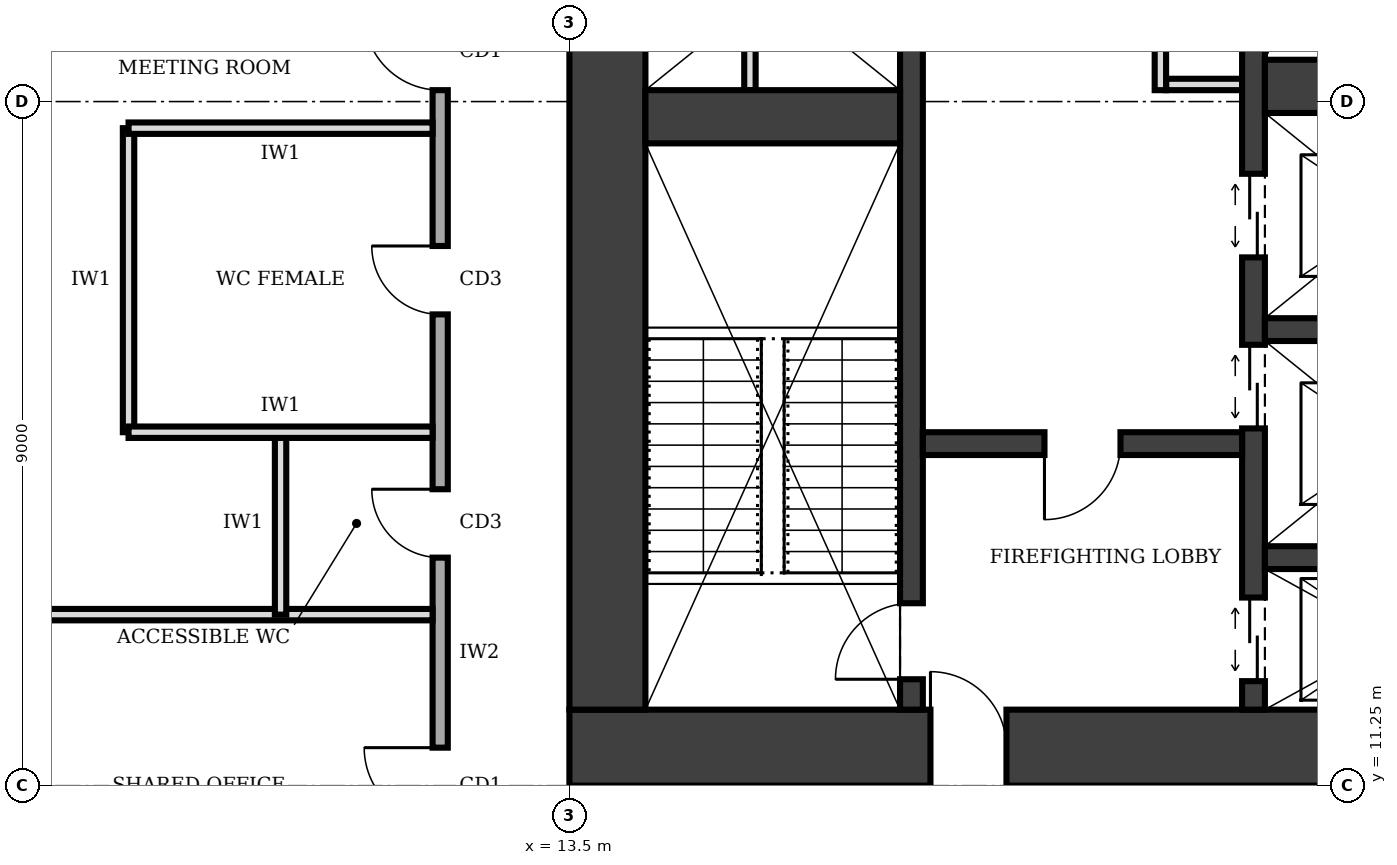
"""IFC4 building model, lengths in metres.
Left out: names, types, materials, properties, quantities, classifications, styles, units other than length and angle.
Written with IfcOpenShell. Run it as: python <this file> out.ifc"""

import sys

from ifc_helpers import new_model, si_unit, direction, frame, frame_2d, origin, place, context, subcontext, project, spatial, rectangle, extrude, element, fill, save


model = new_model("IFC4")
c1 = context("Model", 3, precision=1e-05, world=origin(), true_north=direction((0.0, 1.0)))
c2 = subcontext(c1, "Body", "Model", "MODEL_VIEW")
j1 = project(units=[si_unit("LENGTHUNIT", "METRE"), si_unit("PLANEANGLEUNIT", "RADIAN")], contexts=[c1])
p1 = place(None, origin())
s1 = spatial("IfcSite", under=j1, at=p1, CompositionType="ELEMENT")
p2 = place(p1, origin())
s2 = spatial("IfcBuilding", under=s1, at=p2, CompositionType="ELEMENT")
p3 = place(p2, frame((0.0, 0.0, 145.0)))
s3 = spatial("IfcBuildingStorey", under=s2, at=p3, CompositionType="ELEMENT", Elevation=145.0)
p4 = place(p3, frame((13.5, 11.75, 0.0), z_axis=(0.0, 0.0, 1.0), x_axis=(1.0, 0.0, 0.0)))
e1 = element("IfcWall", 1, at=p4, inside=s3, PredefinedType="SHEAR", context=c2, shape_type="SweptSolid", body=[
    extrude(rectangle(XDim=13.5, YDim=1.0, at=frame_2d((6.75, 0.0))), origin(), (0.0, 0.0, 1.0), 4.0),
])
p5 = place(p4, frame((4.75, 0.0, 0.0)))
e2 = element("IfcOpeningElement", 2, at=p5, cuts=e1, PredefinedType="OPENING", context=c2, shape_type="SweptSolid", body=[
    extrude(rectangle(XDim=1.0, YDim=2.1, at=frame_2d((0.5, 1.05))), frame((0.0, 0.51, 0.0), z_axis=(0.0, -1.0, 0.0), x_axis=(1.0, 0.0, 0.0)), (0.0, 0.0, 1.0), 1.02),
])
p6 = place(p3, frame((14.0, 28.25, 0.0), z_axis=(0.0, 0.0, 1.0), x_axis=(0.0, -1.0, 0.0)))
e3 = element("IfcWall", 3, at=p6, inside=s3, PredefinedType="SHEAR", context=c2, shape_type="SweptSolid", body=[
    extrude(rectangle(XDim=16.0, YDim=1.0, at=frame_2d((8.0, 0.0))), origin(), (0.0, 0.0, 1.0), 4.0),
])
p7 = place(p3, frame((18.0, 12.25, 0.0), z_axis=(0.0, 0.0, 1.0), x_axis=(0.0, 1.0, 0.0)))
e4 = element("IfcWall", 4, at=p7, inside=s3, PredefinedType="SHEAR", context=c2, shape_type="SweptSolid", body=[
    extrude(rectangle(XDim=16.0, YDim=0.3, at=frame_2d((8.0, 0.0))), origin(), (0.0, 0.0, 1.0), 4.0),
])
p8 = place(p7, frame((0.4, 0.0, 0.0)))
e5 = element("IfcOpeningElement", 5, at=p8, cuts=e4, PredefinedType="OPENING", context=c2, shape_type="SweptSolid", body=[
    extrude(rectangle(XDim=1.0, YDim=2.1, at=frame_2d((0.5, 1.05))), frame((0.0, 0.16, 0.0), z_axis=(0.0, -1.0, 0.0), x_axis=(1.0, 0.0, 0.0)), (0.0, 0.0, 1.0), 0.32),
])
p9 = place(p7, frame((14.525, 0.0, 0.0)))
e6 = element("IfcOpeningElement", 6, at=p9, cuts=e4, PredefinedType="OPENING", context=c2, shape_type="SweptSolid", body=[
    extrude(rectangle(XDim=1.1, YDim=2.1, at=frame_2d((0.55, 1.05))), frame((0.0, 0.16, 0.0), z_axis=(0.0, -1.0, 0.0), x_axis=(1.0, 0.0, 0.0)), (0.0, 0.0, 1.0), 0.32),
])
p10 = place(p7, frame((9.0, 0.0, 0.0)))
e7 = element("IfcOpeningElement", 7, at=p10, cuts=e4, PredefinedType="OPENING", context=c2, shape_type="SweptSolid", body=[
    extrude(rectangle(XDim=1.0, YDim=2.1, at=frame_2d((0.5, 1.05))), frame((0.0, 0.16, 0.0), z_axis=(0.0, -1.0, 0.0), x_axis=(1.0, 0.0, 0.0)), (0.0, 0.0, 1.0), 0.32),
])
p11 = place(p7, frame((12.0, 0.0, 0.0)))
e8 = element("IfcOpeningElement", 8, at=p11, cuts=e4, PredefinedType="OPENING", context=c2, shape_type="SweptSolid", body=[
    extrude(rectangle(XDim=1.0, YDim=2.1, at=frame_2d((0.5, 1.05))), frame((0.0, 0.16, 0.0), z_axis=(0.0, -1.0, 0.0), x_axis=(1.0, 0.0, 0.0)), (0.0, 0.0, 1.0), 0.32),
])
p12 = place(p3, frame((22.5, 12.25, 0.0), z_axis=(0.0, 0.0, 1.0), x_axis=(0.0, 1.0, 0.0)))
e9 = element("IfcWall", 9, at=p12, inside=s3, PredefinedType="SHEAR", context=c2, shape_type="SweptSolid", body=[
    extrude(rectangle(XDim=16.0, YDim=0.3, at=frame_2d((8.0, 0.0))), origin(), (0.0, 0.0, 1.0), 4.0),
])
p13 = place(p12, frame((14.6, 0.0, 0.0)))
e10 = element("IfcOpeningElement", 10, at=p13, cuts=e9, PredefinedType="OPENING", context=c2, shape_type="SweptSolid", body=[
    extrude(rectangle(XDim=1.0, YDim=2.1, at=frame_2d((0.5, 1.05))), frame((0.0, 0.16, 0.0), z_axis=(0.0, -1.0, 0.0), x_axis=(1.0, 0.0, 0.0)), (0.0, 0.0, 1.0), 0.32),
])
p14 = place(p12, frame((0.375, 0.0, 0.0)))
e11 = element("IfcOpeningElement", 11, at=p14, cuts=e9, PredefinedType="OPENING", context=c2, shape_type="SweptSolid", body=[
    extrude(rectangle(XDim=1.1, YDim=2.1, at=frame_2d((0.55, 1.05))), frame((0.0, 0.16, 0.0), z_axis=(0.0, -1.0, 0.0), x_axis=(1.0, 0.0, 0.0)), (0.0, 0.0, 1.0), 0.32),
])
p15 = place(p12, frame((3.7, 0.0, 0.0)))
e12 = element("IfcOpeningElement", 12, at=p15, cuts=e9, PredefinedType="OPENING", context=c2, shape_type="SweptSolid", body=[
    extrude(rectangle(XDim=1.1, YDim=2.1, at=frame_2d((0.55, 1.05))), frame((0.0, 0.16, 0.0), z_axis=(0.0, -1.0, 0.0), x_axis=(1.0, 0.0, 0.0)), (0.0, 0.0, 1.0), 0.32),
])
p16 = place(p12, frame((5.95, 0.0, 0.0)))
e13 = element("IfcOpeningElement", 13, at=p16, cuts=e9, PredefinedType="OPENING", context=c2, shape_type="SweptSolid", body=[
    extrude(rectangle(XDim=1.1, YDim=2.1, at=frame_2d((0.55, 1.05))), frame((0.0, 0.16, 0.0), z_axis=(0.0, -1.0, 0.0), x_axis=(1.0, 0.0, 0.0)), (0.0, 0.0, 1.0), 0.32),
])
p17 = place(p3, frame((14.5, 20.05, 0.0), z_axis=(0.0, 0.0, 1.0), x_axis=(1.0, 0.0, 0.0)))
e14 = element("IfcWall", 14, at=p17, inside=s3, PredefinedType="SHEAR", context=c2, shape_type="SweptSolid", body=[
    extrude(rectangle(XDim=3.35, YDim=0.7, at=frame_2d((1.675, 0.0))), origin(), (0.0, 0.0, 1.0), 4.0),
])
p18 = place(p3, frame((18.15, 15.75, 0.0), z_axis=(0.0, 0.0, 1.0), x_axis=(1.0, 0.0, 0.0)))
e15 = element("IfcWall", 15, at=p18, inside=s3, PredefinedType="SHEAR", context=c2, shape_type="SweptSolid", body=[
    extrude(rectangle(XDim=4.2, YDim=0.3, at=frame_2d((2.1, 0.0))), origin(), (0.0, 0.0, 1.0), 4.0),
])
p19 = place(p18, frame((1.6, 0.0, 0.0)))
e16 = element("IfcOpeningElement", 16, at=p19, cuts=e15, PredefinedType="OPENING", context=c2, shape_type="SweptSolid", body=[
    extrude(rectangle(XDim=1.0, YDim=2.1, at=frame_2d((0.5, 1.05))), frame((0.0, 0.16, 0.0), z_axis=(0.0, -1.0, 0.0), x_axis=(1.0, 0.0, 0.0)), (0.0, 0.0, 1.0), 0.32),
])
for number, where, z_axis, x_axis in (
    (17, (22.65, 14.25, 0.0), (0.0, 0.0, 1.0), (1.0, 0.0, 0.0)),
    (18, (22.65, 17.25, 0.0), (0.0, 0.0, 1.0), (1.0, 0.0, 0.0)),
):
    element("IfcWall", number, at=place(p3, frame(where, z_axis=z_axis, x_axis=x_axis)), inside=s3, PredefinedType="SHEAR", context=c2, shape_type="SweptSolid", body=[
        extrude(rectangle(XDim=3.35, YDim=0.3, at=frame_2d((1.675, 0.0))), origin(), (0.0, 0.0, 1.0), 4.0),
    ])
p20 = place(p3, frame((22.65, 20.45, 0.0), z_axis=(0.0, 0.0, 1.0), x_axis=(1.0, 0.0, 0.0)))
e19 = element("IfcWall", 19, at=p20, inside=s3, PredefinedType="SHEAR", context=c2, shape_type="SweptSolid", body=[
    extrude(rectangle(XDim=3.35, YDim=0.7, at=frame_2d((1.675, 0.0))), origin(), (0.0, 0.0, 1.0), 4.0),
])
p21 = place(p3, frame((21.275, 20.4, 0.0), z_axis=(0.0, 0.0, 1.0), x_axis=(0.0, 1.0, 0.0)))
e20 = element("IfcWall", 20, at=p21, inside=s3, PredefinedType="PARTITIONING", context=c2, shape_type="SweptSolid", body=[
    extrude(rectangle(XDim=3.8, YDim=0.15, at=frame_2d((1.9, 0.0))), origin(), (0.0, 0.0, 1.0), 3.75),
])
p22 = place(p21, frame((1.45, 0.0, 0.0)))
e21 = element("IfcOpeningElement", 21, at=p22, cuts=e20, PredefinedType="OPENING", context=c2, shape_type="SweptSolid", body=[
    extrude(rectangle(XDim=0.9, YDim=2.1, at=frame_2d((0.45, 1.05))), frame((0.0, 0.085, 0.0), z_axis=(0.0, -1.0, 0.0), x_axis=(1.0, 0.0, 0.0)), (0.0, 0.0, 1.0), 0.17),
])
p23 = place(p3, frame((21.35, 20.475, 0.0), z_axis=(0.0, 0.0, 1.0), x_axis=(1.0, 0.0, 0.0)))
e22 = element("IfcWall", 22, at=p23, inside=s3, PredefinedType="PARTITIONING", context=c2, shape_type="SweptSolid", body=[
    extrude(rectangle(XDim=1.0, YDim=0.15, at=frame_2d((0.5, 0.0))), origin(), (0.0, 0.0, 1.0), 3.75),
])
p24 = place(p3, frame((15.875, 20.4, 0.0), z_axis=(0.0, 0.0, 1.0), x_axis=(0.0, 1.0, 0.0)))
e23 = element("IfcWall", 23, at=p24, inside=s3, PredefinedType="PARTITIONING", context=c2, shape_type="SweptSolid", body=[
    extrude(rectangle(XDim=2.7, YDim=0.15, at=frame_2d((1.35, 0.0))), origin(), (0.0, 0.0, 1.0), 3.75),
])
p25 = place(p24, frame((0.9, 0.0, 0.0)))
e24 = element("IfcOpeningElement", 24, at=p25, cuts=e23, PredefinedType="OPENING", context=c2, shape_type="SweptSolid", body=[
    extrude(rectangle(XDim=0.9, YDim=2.1, at=frame_2d((0.45, 1.05))), frame((0.0, 0.085, 0.0), z_axis=(0.0, -1.0, 0.0), x_axis=(1.0, 0.0, 0.0)), (0.0, 0.0, 1.0), 0.17),
])
p26 = place(p3, frame((11.8, 31.3, 0.0), z_axis=(0.0, 0.0, 1.0), x_axis=(0.0, -1.0, 0.0)))
e25 = element("IfcWall", 25, at=p26, inside=s3, PredefinedType="SOLIDWALL", context=c2, shape_type="SweptSolid", body=[
    extrude(rectangle(XDim=22.3, YDim=0.2, at=frame_2d((11.15, 0.0))), origin(), (0.0, 0.0, 1.0), 3.75),
])
p27 = place(p26, frame((19.55, 0.0, 0.0)))
e26 = element("IfcOpeningElement", 26, at=p27, cuts=e25, PredefinedType="OPENING", context=c2, shape_type="SweptSolid", body=[
    extrude(rectangle(XDim=1.0, YDim=2.1, at=frame_2d((0.5, 1.05))), frame((0.0, 0.11, 0.0), z_axis=(0.0, -1.0, 0.0), x_axis=(1.0, 0.0, 0.0)), (0.0, 0.0, 1.0), 0.22),
])
p28 = place(p26, frame((16.15, 0.0, 0.0)))
e27 = element("IfcOpeningElement", 27, at=p28, cuts=e25, PredefinedType="OPENING", context=c2, shape_type="SweptSolid", body=[
    extrude(rectangle(XDim=0.9, YDim=2.1, at=frame_2d((0.45, 1.05))), frame((0.0, 0.11, 0.0), z_axis=(0.0, -1.0, 0.0), x_axis=(1.0, 0.0, 0.0)), (0.0, 0.0, 1.0), 0.22),
])
p29 = place(p26, frame((12.95, 0.0, 0.0)))
e28 = element("IfcOpeningElement", 28, at=p29, cuts=e25, PredefinedType="OPENING", context=c2, shape_type="SweptSolid", body=[
    extrude(rectangle(XDim=0.9, YDim=2.1, at=frame_2d((0.45, 1.05))), frame((0.0, 0.11, 0.0), z_axis=(0.0, -1.0, 0.0), x_axis=(1.0, 0.0, 0.0)), (0.0, 0.0, 1.0), 0.22),
])
p30 = place(p26, frame((7.4, 0.0, 0.0)))
e29 = element("IfcOpeningElement", 29, at=p30, cuts=e25, PredefinedType="OPENING", context=c2, shape_type="SweptSolid", body=[
    extrude(rectangle(XDim=0.9, YDim=2.1, at=frame_2d((0.45, 1.05))), frame((0.0, 0.11, 0.0), z_axis=(0.0, -1.0, 0.0), x_axis=(1.0, 0.0, 0.0)), (0.0, 0.0, 1.0), 0.22),
])
p31 = place(p26, frame((4.8, 0.0, 0.0)))
e30 = element("IfcOpeningElement", 30, at=p31, cuts=e25, PredefinedType="OPENING", context=c2, shape_type="SweptSolid", body=[
    extrude(rectangle(XDim=1.0, YDim=2.1, at=frame_2d((0.5, 1.05))), frame((0.0, 0.11, 0.0), z_axis=(0.0, -1.0, 0.0), x_axis=(1.0, 0.0, 0.0)), (0.0, 0.0, 1.0), 0.22),
])
p32 = place(p26, frame((9.9, 0.0, 0.0)))
e31 = element("IfcOpeningElement", 31, at=p32, cuts=e25, PredefinedType="OPENING", context=c2, shape_type="SweptSolid", body=[
    extrude(rectangle(XDim=1.0, YDim=2.1, at=frame_2d((0.5, 1.05))), frame((0.0, 0.11, 0.0), z_axis=(0.0, -1.0, 0.0), x_axis=(1.0, 0.0, 0.0)), (0.0, 0.0, 1.0), 0.22),
])
p33 = place(p26, frame((1.55, 0.0, 0.0)))
e32 = element("IfcOpeningElement", 32, at=p33, cuts=e25, PredefinedType="OPENING", context=c2, shape_type="SweptSolid", body=[
    extrude(rectangle(XDim=1.0, YDim=2.1, at=frame_2d((0.5, 1.05))), frame((0.0, 0.11, 0.0), z_axis=(0.0, -1.0, 0.0), x_axis=(1.0, 0.0, 0.0)), (0.0, 0.0, 1.0), 0.22),
])
p34 = place(p3, frame((0.3, 13.5, 0.0), z_axis=(0.0, 0.0, 1.0), x_axis=(1.0, 0.0, 0.0)))
e33 = element("IfcWall", 33, at=p34, inside=s3, PredefinedType="PARTITIONING", context=c2, shape_type="SweptSolid", body=[
    extrude(rectangle(XDim=11.4, YDim=0.15, at=frame_2d((5.7, 0.0))), origin(), (0.0, 0.0, 1.0), 3.75),
])
p35 = place(p3, frame((11.7, 15.9, 0.0), z_axis=(0.0, 0.0, 1.0), x_axis=(-1.0, 0.0, 0.0)))
e34 = element("IfcWall", 34, at=p35, inside=s3, PredefinedType="PARTITIONING", context=c2, shape_type="SweptSolid", body=[
    extrude(rectangle(XDim=4.0, YDim=0.15, at=frame_2d((2.0, 0.0))), origin(), (0.0, 0.0, 1.0), 3.75),
])
p36 = place(p3, frame((11.7, 19.9, 0.0), z_axis=(0.0, 0.0, 1.0), x_axis=(-1.0, 0.0, 0.0)))
e35 = element("IfcWall", 35, at=p36, inside=s3, PredefinedType="PARTITIONING", context=c2, shape_type="SweptSolid", body=[
    extrude(rectangle(XDim=4.0, YDim=0.15, at=frame_2d((2.0, 0.0))), origin(), (0.0, 0.0, 1.0), 2.85),
])
p37 = place(p3, frame((9.7, 13.5, 0.0), z_axis=(0.0, 0.0, 1.0), x_axis=(0.0, 1.0, 0.0)))
e36 = element("IfcWall", 36, at=p37, inside=s3, PredefinedType="PARTITIONING", context=c2, shape_type="SweptSolid", body=[
    extrude(rectangle(XDim=2.4, YDim=0.15, at=frame_2d((1.2, 0.0))), origin(), (0.0, 0.0, 1.0), 3.75),
])
p38 = place(p3, frame((7.7, 15.9, 0.0), z_axis=(0.0, 0.0, 1.0), x_axis=(0.0, 1.0, 0.0)))
e37 = element("IfcWall", 37, at=p38, inside=s3, PredefinedType="PARTITIONING", context=c2, shape_type="SweptSolid", body=[
    extrude(rectangle(XDim=4.0, YDim=0.15, at=frame_2d((2.0, 0.0))), origin(), (0.0, 0.0, 1.0), 3.75),
])
p39 = place(p5, origin())
e38 = element("IfcDoor", 38, at=p39, inside=s3, OperationType="SINGLE_SWING_LEFT", PredefinedType="DOOR", context=c2, shape_type="SweptSolid", body=[
    extrude(rectangle(XDim=1.0, YDim=2.1, at=frame_2d((0.5, 1.05))), frame((0.0, 0.025, 0.0), z_axis=(0.0, -1.0, 0.0), x_axis=(1.0, 0.0, 0.0)), (0.0, 0.0, 1.0), 0.05),
])
fill(e2, e38)
p40 = place(p19, frame((1.0, 0.0, 0.0), z_axis=(0.0, 0.0, 1.0), x_axis=(-1.0, 0.0, 0.0)))
e39 = element("IfcDoor", 39, at=p40, inside=s3, OperationType="SINGLE_SWING_RIGHT", PredefinedType="DOOR", context=c2, shape_type="SweptSolid", body=[
    extrude(rectangle(XDim=1.0, YDim=2.1, at=frame_2d((0.5, 1.05))), frame((0.0, 0.025, 0.0), z_axis=(0.0, -1.0, 0.0), x_axis=(1.0, 0.0, 0.0)), (0.0, 0.0, 1.0), 0.05),
])
fill(e16, e39)
p41 = place(p8, origin())
e40 = element("IfcDoor", 40, at=p41, inside=s3, OperationType="SINGLE_SWING_LEFT", PredefinedType="DOOR", context=c2, shape_type="SweptSolid", body=[
    extrude(rectangle(XDim=1.0, YDim=2.1, at=frame_2d((0.5, 1.05))), frame((0.0, 0.025, 0.0), z_axis=(0.0, -1.0, 0.0), x_axis=(1.0, 0.0, 0.0)), (0.0, 0.0, 1.0), 0.05),
])
fill(e5, e40)
p42 = place(p14, origin())
e41 = element("IfcDoor", 41, at=p42, inside=s3, OperationType="DOUBLE_DOOR_SLIDING", PredefinedType="DOOR", context=c2, shape_type="SweptSolid", body=[
    extrude(rectangle(XDim=1.1, YDim=2.1, at=frame_2d((0.55, 1.05))), frame((0.0, 0.025, 0.0), z_axis=(0.0, -1.0, 0.0), x_axis=(1.0, 0.0, 0.0)), (0.0, 0.0, 1.0), 0.05),
])
fill(e11, e41)
p43 = place(p15, origin())
e42 = element("IfcDoor", 42, at=p43, inside=s3, OperationType="DOUBLE_DOOR_SLIDING", PredefinedType="DOOR", context=c2, shape_type="SweptSolid", body=[
    extrude(rectangle(XDim=1.1, YDim=2.1, at=frame_2d((0.55, 1.05))), frame((0.0, 0.025, 0.0), z_axis=(0.0, -1.0, 0.0), x_axis=(1.0, 0.0, 0.0)), (0.0, 0.0, 1.0), 0.05),
])
fill(e12, e42)
p44 = place(p16, origin())
e43 = element("IfcDoor", 43, at=p44, inside=s3, OperationType="DOUBLE_DOOR_SLIDING", PredefinedType="DOOR", context=c2, shape_type="SweptSolid", body=[
    extrude(rectangle(XDim=1.1, YDim=2.1, at=frame_2d((0.55, 1.05))), frame((0.0, 0.025, 0.0), z_axis=(0.0, -1.0, 0.0), x_axis=(1.0, 0.0, 0.0)), (0.0, 0.0, 1.0), 0.05),
])
fill(e13, e43)
p45 = place(p27, frame((1.0, 0.0, 0.0), z_axis=(0.0, 0.0, 1.0), x_axis=(-1.0, 0.0, 0.0)))
e44 = element("IfcDoor", 44, at=p45, inside=s3, OperationType="SINGLE_SWING_RIGHT", PredefinedType="DOOR", context=c2, shape_type="SweptSolid", body=[
    extrude(rectangle(XDim=1.0, YDim=2.1, at=frame_2d((0.5, 1.05))), frame((0.0, 0.025, 0.0), z_axis=(0.0, -1.0, 0.0), x_axis=(1.0, 0.0, 0.0)), (0.0, 0.0, 1.0), 0.05),
])
fill(e26, e44)
p46 = place(p28, frame((0.9, 0.0, 0.0), z_axis=(0.0, 0.0, 1.0), x_axis=(-1.0, 0.0, 0.0)))
e45 = element("IfcDoor", 45, at=p46, inside=s3, OperationType="SINGLE_SWING_RIGHT", PredefinedType="DOOR", context=c2, shape_type="SweptSolid", body=[
    extrude(rectangle(XDim=0.9, YDim=2.1, at=frame_2d((0.45, 1.05))), frame((0.0, 0.025, 0.0), z_axis=(0.0, -1.0, 0.0), x_axis=(1.0, 0.0, 0.0)), (0.0, 0.0, 1.0), 0.05),
])
fill(e27, e45)
p47 = place(p29, frame((0.9, 0.0, 0.0), z_axis=(0.0, 0.0, 1.0), x_axis=(-1.0, 0.0, 0.0)))
e46 = element("IfcDoor", 46, at=p47, inside=s3, OperationType="SINGLE_SWING_RIGHT", PredefinedType="DOOR", context=c2, shape_type="SweptSolid", body=[
    extrude(rectangle(XDim=0.9, YDim=2.1, at=frame_2d((0.45, 1.05))), frame((0.0, 0.025, 0.0), z_axis=(0.0, -1.0, 0.0), x_axis=(1.0, 0.0, 0.0)), (0.0, 0.0, 1.0), 0.05),
])
fill(e28, e46)
p48 = place(p32, frame((1.0, 0.0, 0.0), z_axis=(0.0, 0.0, 1.0), x_axis=(-1.0, 0.0, 0.0)))
e47 = element("IfcDoor", 47, at=p48, inside=s3, OperationType="SINGLE_SWING_RIGHT", PredefinedType="DOOR", context=c2, shape_type="SweptSolid", body=[
    extrude(rectangle(XDim=1.0, YDim=2.1, at=frame_2d((0.5, 1.05))), frame((0.0, 0.025, 0.0), z_axis=(0.0, -1.0, 0.0), x_axis=(1.0, 0.0, 0.0)), (0.0, 0.0, 1.0), 0.05),
])
fill(e31, e47)
save(model, sys.argv[1])
